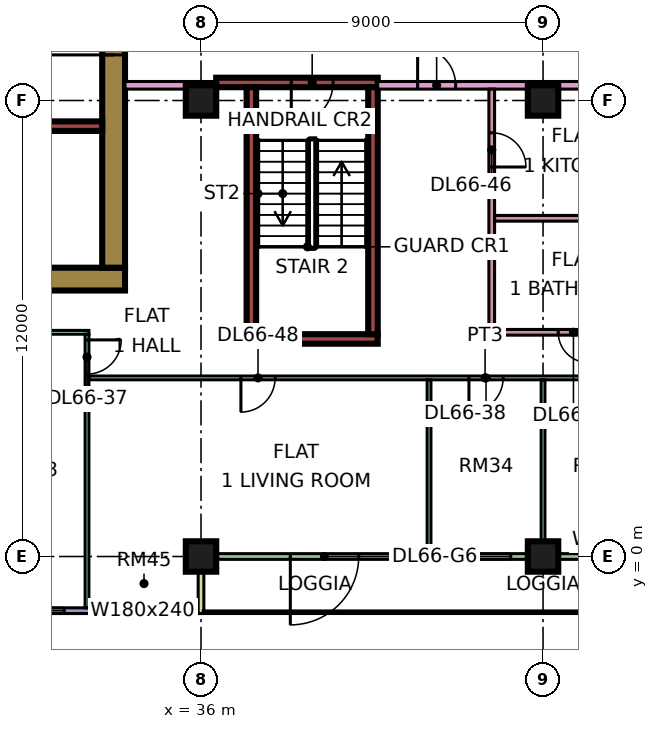
"""IFC4 building model, lengths in metres.
Left out: names, types, materials, properties, quantities, classifications, styles, units other than length and angle.
Written with IfcOpenShell. Run it as: python <this file> out.ifc"""

import sys

from ifc_helpers import new_model, si_unit, direction, frame, frame_2d, origin, origin_2d, place, context, subcontext, project, spatial, rectangle, extrude, element, fill, save


model = new_model("IFC4")
c1 = context("Model", 3, precision=1e-05, world=origin(), true_north=direction((0.0, 1.0)))
c2 = subcontext(c1, "Body", "Model", "MODEL_VIEW")
j1 = project(units=[si_unit("LENGTHUNIT", "METRE"), si_unit("PLANEANGLEUNIT", "RADIAN")], contexts=[c1])
p1 = place(None, origin())
s1 = spatial("IfcSite", under=j1, at=p1, CompositionType="ELEMENT")
p2 = place(p1, origin())
s2 = spatial("IfcBuilding", under=s1, at=p2, CompositionType="ELEMENT")
p3 = place(p2, frame((0.0, 0.0, 284.65)))
s3 = spatial("IfcBuildingStorey", under=s2, at=p3, CompositionType="ELEMENT", Elevation=284.65)
for number, where, z_axis, x_axis in (
    (1, (36.0, 0.0, 0.0), (0.0, 0.0, 1.0), (1.0, 0.0, 0.0)),
    (2, (36.0, 12.0, 0.0), (0.0, 0.0, 1.0), (1.0, 0.0, 0.0)),
    (3, (45.0, 0.0, 0.0), (0.0, 0.0, 1.0), (1.0, 0.0, 0.0)),
    (4, (45.0, 12.0, 0.0), (0.0, 0.0, 1.0), (1.0, 0.0, 0.0)),
):
    element("IfcColumn", number, at=place(p3, frame(where, z_axis=z_axis, x_axis=x_axis)), inside=s3, PredefinedType="COLUMN", context=c2, shape_type="SweptSolid", body=[
        extrude(rectangle(XDim=0.8, YDim=0.8, at=origin_2d()), origin(), (0.0, 0.0, 1.0), 3.75),
    ])
p4 = place(p3, frame((9.0, 7.3, 0.0), z_axis=(0.0, 0.0, 1.0), x_axis=(1.0, 0.0, 0.0)))
e5 = element("IfcWall", 5, at=p4, inside=s3, PredefinedType="SHEAR", context=c2, shape_type="SweptSolid", body=[
    extrude(rectangle(XDim=25.0, YDim=0.6, at=frame_2d((12.5, 0.0))), origin(), (0.0, 0.0, 1.0), 3.75),
])
p5 = place(p3, frame((33.7, 7.6, 0.0), z_axis=(0.0, 0.0, 1.0), x_axis=(0.0, 1.0, 0.0)))
e6 = element("IfcWall", 6, at=p5, inside=s3, PredefinedType="SHEAR", context=c2, shape_type="SweptSolid", body=[
    extrude(rectangle(XDim=11.8, YDim=0.6, at=frame_2d((5.9, 0.0))), origin(), (0.0, 0.0, 1.0), 3.75),
])
p6 = place(p5, frame((5.6, 0.0, 0.0)))
e7 = element("IfcOpeningElement", 7, at=p6, cuts=e6, PredefinedType="OPENING", context=c2, shape_type="SweptSolid", body=[
    extrude(rectangle(XDim=1.8, YDim=2.4, at=frame_2d((0.9, 1.2))), frame((0.0, 0.31, 0.0), z_axis=(0.0, -1.0, 0.0), x_axis=(1.0, 0.0, 0.0)), (0.0, 0.0, 1.0), 0.62),
])
p7 = place(p3, frame((13.45, 11.325, 0.0), z_axis=(0.0, 0.0, 1.0), x_axis=(1.0, 0.0, 0.0)))
e8 = element("IfcWall", 8, at=p7, inside=s3, PredefinedType="SHEAR", context=c2, shape_type="SweptSolid", body=[
    extrude(rectangle(XDim=19.95, YDim=0.25, at=frame_2d((9.975, 0.0))), origin(), (0.0, 0.0, 1.0), 3.75),
])
p8 = place(p7, frame((1.55, 0.0, 0.0)))
e9 = element("IfcOpeningElement", 9, at=p8, cuts=e8, PredefinedType="OPENING", context=c2, shape_type="SweptSolid", body=[
    extrude(rectangle(XDim=0.9, YDim=2.1, at=frame_2d((0.45, 1.05))), frame((0.0, 0.135, 0.0), z_axis=(0.0, -1.0, 0.0), x_axis=(1.0, 0.0, 0.0)), (0.0, 0.0, 1.0), 0.27),
])
p9 = place(p7, frame((6.925, 0.0, 0.0)))
e10 = element("IfcOpeningElement", 10, at=p9, cuts=e8, PredefinedType="OPENING", context=c2, shape_type="SweptSolid", body=[
    extrude(rectangle(XDim=0.9, YDim=2.1, at=frame_2d((0.45, 1.05))), frame((0.0, 0.135, 0.0), z_axis=(0.0, -1.0, 0.0), x_axis=(1.0, 0.0, 0.0)), (0.0, 0.0, 1.0), 0.27),
])
p10 = place(p7, frame((15.025, 0.0, 0.0)))
e11 = element("IfcOpeningElement", 11, at=p10, cuts=e8, PredefinedType="OPENING", context=c2, shape_type="SweptSolid", body=[
    extrude(rectangle(XDim=0.9, YDim=2.1, at=frame_2d((0.45, 1.05))), frame((0.0, 0.135, 0.0), z_axis=(0.0, -1.0, 0.0), x_axis=(1.0, 0.0, 0.0)), (0.0, 0.0, 1.0), 0.27),
])
p11 = place(p3, frame((37.2, 5.725, 0.0), z_axis=(0.0, 0.0, 1.0), x_axis=(1.0, 0.0, 0.0)))
e12 = element("IfcWall", 12, at=p11, inside=s3, PredefinedType="SHEAR", context=c2, shape_type="SweptSolid", body=[
    extrude(rectangle(XDim=3.45, YDim=0.25, at=frame_2d((1.725, 0.0))), origin(), (0.0, 0.0, 1.0), 3.75),
])
p12 = place(p3, frame((36.4, 12.475, 0.0), z_axis=(0.0, 0.0, 1.0), x_axis=(1.0, 0.0, 0.0)))
e13 = element("IfcWall", 13, at=p12, inside=s3, PredefinedType="SHEAR", context=c2, shape_type="SweptSolid", body=[
    extrude(rectangle(XDim=4.25, YDim=0.25, at=frame_2d((2.125, 0.0))), origin(), (0.0, 0.0, 1.0), 3.75),
])
p13 = place(p12, frame((1.975, 0.0, 0.0)))
e14 = element("IfcOpeningElement", 14, at=p13, cuts=e13, PredefinedType="OPENING", context=c2, shape_type="SweptSolid", body=[
    extrude(rectangle(XDim=1.1, YDim=2.2, at=frame_2d((0.55, 1.1))), frame((0.0, 0.135, 0.0), z_axis=(0.0, -1.0, 0.0), x_axis=(1.0, 0.0, 0.0)), (0.0, 0.0, 1.0), 0.27),
])
for number, where, z_axis, x_axis in (
    (15, (37.325, 5.85, 0.0), (0.0, 0.0, 1.0), (0.0, 1.0, 0.0)),
    (16, (40.525, 5.85, 0.0), (0.0, 0.0, 1.0), (0.0, 1.0, 0.0)),
):
    element("IfcWall", number, at=place(p3, frame(where, z_axis=z_axis, x_axis=x_axis)), inside=s3, PredefinedType="SHEAR", context=c2, shape_type="SweptSolid", body=[
        extrude(rectangle(XDim=6.5, YDim=0.25, at=frame_2d((3.25, 0.0))), origin(), (0.0, 0.0, 1.0), 3.75),
    ])
p14 = place(p3, frame((24.075, -1.425, 0.0), z_axis=(0.0, 0.0, 1.0), x_axis=(1.0, 0.0, 0.0)))
e17 = element("IfcWall", 17, at=p14, inside=s3, PredefinedType="SOLIDWALL", context=c2, shape_type="SweptSolid", body=[
    extrude(rectangle(XDim=11.85, YDim=0.15, at=frame_2d((5.925, 0.0))), origin(), (0.0, 0.0, 1.0), 3.35),
])
p15 = place(p14, frame((0.562, 0.0, 0.45)))
e18 = element("IfcOpeningElement", 18, at=p15, cuts=e17, PredefinedType="OPENING", context=c2, shape_type="SweptSolid", body=[
    extrude(rectangle(XDim=1.8, YDim=2.4, at=frame_2d((0.9, 1.2))), frame((0.0, 0.085, 0.0), z_axis=(0.0, -1.0, 0.0), x_axis=(1.0, 0.0, 0.0)), (0.0, 0.0, 1.0), 0.17),
])
p16 = place(p14, frame((3.525, 0.0, 0.45)))
e19 = element("IfcOpeningElement", 19, at=p16, cuts=e17, PredefinedType="OPENING", context=c2, shape_type="SweptSolid", body=[
    extrude(rectangle(XDim=1.8, YDim=2.4, at=frame_2d((0.9, 1.2))), frame((0.0, 0.085, 0.0), z_axis=(0.0, -1.0, 0.0), x_axis=(1.0, 0.0, 0.0)), (0.0, 0.0, 1.0), 0.17),
])
p17 = place(p14, frame((6.525, 0.0, 0.45)))
e20 = element("IfcOpeningElement", 20, at=p17, cuts=e17, PredefinedType="OPENING", context=c2, shape_type="SweptSolid", body=[
    extrude(rectangle(XDim=1.8, YDim=2.4, at=frame_2d((0.9, 1.2))), frame((0.0, 0.085, 0.0), z_axis=(0.0, -1.0, 0.0), x_axis=(1.0, 0.0, 0.0)), (0.0, 0.0, 1.0), 0.17),
])
p18 = place(p14, frame((9.488, 0.0, 0.45)))
e21 = element("IfcOpeningElement", 21, at=p18, cuts=e17, PredefinedType="OPENING", context=c2, shape_type="SweptSolid", body=[
    extrude(rectangle(XDim=1.8, YDim=2.4, at=frame_2d((0.9, 1.2))), frame((0.0, 0.085, 0.0), z_axis=(0.0, -1.0, 0.0), x_axis=(1.0, 0.0, 0.0)), (0.0, 0.0, 1.0), 0.17),
])
p19 = place(p3, frame((36.075, 0.0, 0.0), z_axis=(0.0, 0.0, 1.0), x_axis=(1.0, 0.0, 0.0)))
e22 = element("IfcWall", 22, at=p19, inside=s3, PredefinedType="SOLIDWALL", context=c2, shape_type="SweptSolid", body=[
    extrude(rectangle(XDim=11.85, YDim=0.15, at=frame_2d((5.925, 0.0))), origin(), (0.0, 0.0, 1.0), 3.35),
])
p20 = place(p19, frame((2.275, 0.0, 0.0)))
e23 = element("IfcOpeningElement", 23, at=p20, cuts=e22, PredefinedType="OPENING", context=c2, shape_type="SweptSolid", body=[
    extrude(rectangle(XDim=1.8, YDim=2.4, at=frame_2d((0.9, 1.2))), frame((0.0, 0.085, 0.0), z_axis=(0.0, -1.0, 0.0), x_axis=(1.0, 0.0, 0.0)), (0.0, 0.0, 1.0), 0.17),
])
p21 = place(p19, frame((6.275, 0.0, 0.45)))
e24 = element("IfcOpeningElement", 24, at=p21, cuts=e22, PredefinedType="OPENING", context=c2, shape_type="SweptSolid", body=[
    extrude(rectangle(XDim=1.8, YDim=2.4, at=frame_2d((0.9, 1.2))), frame((0.0, 0.085, 0.0), z_axis=(0.0, -1.0, 0.0), x_axis=(1.0, 0.0, 0.0)), (0.0, 0.0, 1.0), 0.17),
])
p22 = place(p19, frame((10.038, 0.0, 0.45)))
e25 = element("IfcOpeningElement", 25, at=p22, cuts=e22, PredefinedType="OPENING", context=c2, shape_type="SweptSolid", body=[
    extrude(rectangle(XDim=1.2, YDim=2.4, at=frame_2d((0.6, 1.2))), frame((0.0, 0.085, 0.0), z_axis=(0.0, -1.0, 0.0), x_axis=(1.0, 0.0, 0.0)), (0.0, 0.0, 1.0), 0.17),
])
p23 = place(p3, frame((36.0, -1.5, 0.0), z_axis=(0.0, 0.0, 1.0), x_axis=(0.0, 1.0, 0.0)))
e26 = element("IfcWall", 26, at=p23, inside=s3, PredefinedType="SOLIDWALL", context=c2, shape_type="SweptSolid", body=[
    extrude(rectangle(XDim=1.5, YDim=0.15, at=frame_2d((0.75, 0.0))), origin(), (0.0, 0.0, 1.0), 3.35),
])
p24 = place(p3, frame((11.95, 5.9, 0.0), z_axis=(0.0, 0.0, 1.0), x_axis=(1.0, 0.0, 0.0)))
e27 = element("IfcWall", 27, at=p24, inside=s3, PredefinedType="PARTITIONING", context=c2, shape_type="SweptSolid", body=[
    extrude(rectangle(XDim=21.1, YDim=0.1, at=frame_2d((10.55, 0.0))), origin(), (0.0, 0.0, 1.0), 3.35),
])
p25 = place(p24, frame((10.1, 0.0, 0.0)))
e28 = element("IfcOpeningElement", 28, at=p25, cuts=e27, PredefinedType="OPENING", context=c2, shape_type="SweptSolid", body=[
    extrude(rectangle(XDim=0.9, YDim=2.1, at=frame_2d((0.45, 1.05))), frame((0.0, 0.06, 0.0), z_axis=(0.0, -1.0, 0.0), x_axis=(1.0, 0.0, 0.0)), (0.0, 0.0, 1.0), 0.12),
])
p26 = place(p24, frame((13.1, 0.0, 0.0)))
e29 = element("IfcOpeningElement", 29, at=p26, cuts=e27, PredefinedType="OPENING", context=c2, shape_type="SweptSolid", body=[
    extrude(rectangle(XDim=0.9, YDim=2.1, at=frame_2d((0.45, 1.05))), frame((0.0, 0.06, 0.0), z_axis=(0.0, -1.0, 0.0), x_axis=(1.0, 0.0, 0.0)), (0.0, 0.0, 1.0), 0.12),
])
p27 = place(p24, frame((16.1, 0.0, 0.0)))
e30 = element("IfcOpeningElement", 30, at=p27, cuts=e27, PredefinedType="OPENING", context=c2, shape_type="SweptSolid", body=[
    extrude(rectangle(XDim=0.9, YDim=2.1, at=frame_2d((0.45, 1.05))), frame((0.0, 0.06, 0.0), z_axis=(0.0, -1.0, 0.0), x_axis=(1.0, 0.0, 0.0)), (0.0, 0.0, 1.0), 0.12),
])
p28 = place(p24, frame((4.1, 0.0, 0.0)))
e31 = element("IfcOpeningElement", 31, at=p28, cuts=e27, PredefinedType="OPENING", context=c2, shape_type="SweptSolid", body=[
    extrude(rectangle(XDim=0.9, YDim=2.1, at=frame_2d((0.45, 1.05))), frame((0.0, 0.06, 0.0), z_axis=(0.0, -1.0, 0.0), x_axis=(1.0, 0.0, 0.0)), (0.0, 0.0, 1.0), 0.12),
])
p29 = place(p3, frame((33.0, -1.35, 0.0), z_axis=(0.0, 0.0, 1.0), x_axis=(0.0, 1.0, 0.0)))
e32 = element("IfcWall", 32, at=p29, inside=s3, PredefinedType="PARTITIONING", context=c2, shape_type="SweptSolid", body=[
    extrude(rectangle(XDim=7.2, YDim=0.1, at=frame_2d((3.6, 0.0))), origin(), (0.0, 0.0, 1.0), 3.35),
])
p30 = place(p29, frame((6.15, 0.0, 0.0)))
e33 = element("IfcOpeningElement", 33, at=p30, cuts=e32, PredefinedType="OPENING", context=c2, shape_type="SweptSolid", body=[
    extrude(rectangle(XDim=0.9, YDim=2.1, at=frame_2d((0.45, 1.05))), frame((0.0, 0.06, 0.0), z_axis=(0.0, -1.0, 0.0), x_axis=(1.0, 0.0, 0.0)), (0.0, 0.0, 1.0), 0.12),
])
p31 = place(p3, frame((33.05, 4.7, 0.0), z_axis=(0.0, 0.0, 1.0), x_axis=(1.0, 0.0, 0.0)))
e34 = element("IfcWall", 34, at=p31, inside=s3, PredefinedType="PARTITIONING", context=c2, shape_type="SweptSolid", body=[
    extrude(rectangle(XDim=20.85, YDim=0.1, at=frame_2d((10.425, 0.0))), origin(), (0.0, 0.0, 1.0), 3.35),
])
p32 = place(p31, frame((10.0, 0.0, 0.0)))
e35 = element("IfcOpeningElement", 35, at=p32, cuts=e34, PredefinedType="OPENING", context=c2, shape_type="SweptSolid", body=[
    extrude(rectangle(XDim=0.9, YDim=2.1, at=frame_2d((0.45, 1.05))), frame((0.0, 0.06, 0.0), z_axis=(0.0, -1.0, 0.0), x_axis=(1.0, 0.0, 0.0)), (0.0, 0.0, 1.0), 0.12),
])
p33 = place(p31, frame((13.0, 0.0, 0.0)))
e36 = element("IfcOpeningElement", 36, at=p33, cuts=e34, PredefinedType="OPENING", context=c2, shape_type="SweptSolid", body=[
    extrude(rectangle(XDim=0.9, YDim=2.1, at=frame_2d((0.45, 1.05))), frame((0.0, 0.06, 0.0), z_axis=(0.0, -1.0, 0.0), x_axis=(1.0, 0.0, 0.0)), (0.0, 0.0, 1.0), 0.12),
])
p34 = place(p31, frame((16.0, 0.0, 0.0)))
e37 = element("IfcOpeningElement", 37, at=p34, cuts=e34, PredefinedType="OPENING", context=c2, shape_type="SweptSolid", body=[
    extrude(rectangle(XDim=0.9, YDim=2.1, at=frame_2d((0.45, 1.05))), frame((0.0, 0.06, 0.0), z_axis=(0.0, -1.0, 0.0), x_axis=(1.0, 0.0, 0.0)), (0.0, 0.0, 1.0), 0.12),
])
p35 = place(p31, frame((19.0, 0.0, 0.0)))
e38 = element("IfcOpeningElement", 38, at=p35, cuts=e34, PredefinedType="OPENING", context=c2, shape_type="SweptSolid", body=[
    extrude(rectangle(XDim=0.9, YDim=2.1, at=frame_2d((0.45, 1.05))), frame((0.0, 0.06, 0.0), z_axis=(0.0, -1.0, 0.0), x_axis=(1.0, 0.0, 0.0)), (0.0, 0.0, 1.0), 0.12),
])
p36 = place(p31, frame((4.0, 0.0, 0.0)))
e39 = element("IfcOpeningElement", 39, at=p36, cuts=e34, PredefinedType="OPENING", context=c2, shape_type="SweptSolid", body=[
    extrude(rectangle(XDim=0.9, YDim=2.1, at=frame_2d((0.45, 1.05))), frame((0.0, 0.06, 0.0), z_axis=(0.0, -1.0, 0.0), x_axis=(1.0, 0.0, 0.0)), (0.0, 0.0, 1.0), 0.12),
])
p37 = place(p3, frame((34.0, 12.4, 0.0), z_axis=(0.0, 0.0, 1.0), x_axis=(1.0, 0.0, 0.0)))
e40 = element("IfcWall", 40, at=p37, inside=s3, PredefinedType="PARTITIONING", context=c2, shape_type="SweptSolid", body=[
    extrude(rectangle(XDim=2.401, YDim=0.2, at=frame_2d((1.2, 0.0))), origin(), (0.0, 0.0, 1.0), 3.35),
])
p38 = place(p3, frame((40.65, 12.4, 0.0), z_axis=(0.0, 0.0, 1.0), x_axis=(1.0, 0.0, 0.0)))
e41 = element("IfcWall", 41, at=p38, inside=s3, PredefinedType="PARTITIONING", context=c2, shape_type="SweptSolid", body=[
    extrude(rectangle(XDim=22.276, YDim=0.2, at=frame_2d((11.138, 0.0))), origin(), (0.0, 0.0, 1.0), 3.35),
])
p39 = place(p38, frame((14.7, 0.0, 0.0)))
e42 = element("IfcOpeningElement", 42, at=p39, cuts=e41, PredefinedType="OPENING", context=c2, shape_type="SweptSolid", body=[
    extrude(rectangle(XDim=1.0, YDim=2.1, at=frame_2d((0.5, 1.05))), frame((0.0, 0.11, 0.0), z_axis=(0.0, -1.0, 0.0), x_axis=(1.0, 0.0, 0.0)), (0.0, 0.0, 1.0), 0.22),
])
p40 = place(p38, frame((1.05, 0.0, 0.0)))
e43 = element("IfcOpeningElement", 43, at=p40, cuts=e41, PredefinedType="OPENING", context=c2, shape_type="SweptSolid", body=[
    extrude(rectangle(XDim=1.0, YDim=2.1, at=frame_2d((0.5, 1.05))), frame((0.0, 0.11, 0.0), z_axis=(0.0, -1.0, 0.0), x_axis=(1.0, 0.0, 0.0)), (0.0, 0.0, 1.0), 0.22),
])
p41 = place(p3, frame((42.0, 0.074, 0.0), z_axis=(0.0, 0.0, 1.0), x_axis=(0.0, 1.0, 0.0)))
e44 = element("IfcWall", 44, at=p41, inside=s3, PredefinedType="PARTITIONING", context=c2, shape_type="SweptSolid", body=[
    extrude(rectangle(XDim=4.576, YDim=0.1, at=frame_2d((2.288, 0.0))), origin(), (0.0, 0.0, 1.0), 3.35),
])
p42 = place(p3, frame((43.575, 5.9, 0.0), z_axis=(0.0, 0.0, 1.0), x_axis=(1.0, 0.0, 0.0)))
e45 = element("IfcWall", 45, at=p42, inside=s3, PredefinedType="PARTITIONING", context=c2, shape_type="SweptSolid", body=[
    extrude(rectangle(XDim=10.325, YDim=0.15, at=frame_2d((5.163, 0.0))), origin(), (0.0, 0.0, 1.0), 3.35),
])
p43 = place(p42, frame((1.825, 0.0, 0.0)))
e46 = element("IfcOpeningElement", 46, at=p43, cuts=e45, PredefinedType="OPENING", context=c2, shape_type="SweptSolid", body=[
    extrude(rectangle(XDim=0.8, YDim=2.1, at=frame_2d((0.4, 1.05))), frame((0.0, 0.085, 0.0), z_axis=(0.0, -1.0, 0.0), x_axis=(1.0, 0.0, 0.0)), (0.0, 0.0, 1.0), 0.17),
])
p44 = place(p42, frame((6.975, 0.0, 0.0)))
e47 = element("IfcOpeningElement", 47, at=p44, cuts=e45, PredefinedType="OPENING", context=c2, shape_type="SweptSolid", body=[
    extrude(rectangle(XDim=0.9, YDim=2.1, at=frame_2d((0.45, 1.05))), frame((0.0, 0.085, 0.0), z_axis=(0.0, -1.0, 0.0), x_axis=(1.0, 0.0, 0.0)), (0.0, 0.0, 1.0), 0.17),
])
p45 = place(p3, frame((43.65, 5.975, 0.0), z_axis=(0.0, 0.0, 1.0), x_axis=(0.0, 1.0, 0.0)))
e48 = element("IfcWall", 48, at=p45, inside=s3, PredefinedType="PARTITIONING", context=c2, shape_type="SweptSolid", body=[
    extrude(rectangle(XDim=6.325, YDim=0.15, at=frame_2d((3.163, 0.0))), origin(), (0.0, 0.0, 1.0), 3.35),
])
p46 = place(p45, frame((4.275, 0.0, 0.0)))
e49 = element("IfcOpeningElement", 49, at=p46, cuts=e48, PredefinedType="OPENING", context=c2, shape_type="SweptSolid", body=[
    extrude(rectangle(XDim=0.9, YDim=2.1, at=frame_2d((0.45, 1.05))), frame((0.0, 0.085, 0.0), z_axis=(0.0, -1.0, 0.0), x_axis=(1.0, 0.0, 0.0)), (0.0, 0.0, 1.0), 0.17),
])
p47 = place(p3, frame((43.725, 8.9, 0.0), z_axis=(0.0, 0.0, 1.0), x_axis=(1.0, 0.0, 0.0)))
e50 = element("IfcWall", 50, at=p47, inside=s3, PredefinedType="PARTITIONING", context=c2, shape_type="SweptSolid", body=[
    extrude(rectangle(XDim=4.2, YDim=0.15, at=frame_2d((2.1, 0.0))), origin(), (0.0, 0.0, 1.0), 3.35),
])
p48 = place(p3, frame((45.0, 0.074, 0.0), z_axis=(0.0, 0.0, 1.0), x_axis=(0.0, 1.0, 0.0)))
e51 = element("IfcWall", 51, at=p48, inside=s3, PredefinedType="PARTITIONING", context=c2, shape_type="SweptSolid", body=[
    extrude(rectangle(XDim=4.576, YDim=0.1, at=frame_2d((2.288, 0.0))), origin(), (0.0, 0.0, 1.0), 3.35),
])
p49 = place(p17, origin())
e52 = element("IfcWindow", 52, at=p49, inside=s3, PartitioningType="SINGLE_PANEL", PredefinedType="WINDOW", context=c2, shape_type="SweptSolid", body=[
    extrude(rectangle(XDim=1.8, YDim=2.4, at=frame_2d((0.9, 1.2))), frame((0.0, 0.03, 0.0), z_axis=(0.0, -1.0, 0.0), x_axis=(1.0, 0.0, 0.0)), (0.0, 0.0, 1.0), 0.06),
])
fill(e20, e52)
p50 = place(p18, origin())
e53 = element("IfcWindow", 53, at=p50, inside=s3, PartitioningType="SINGLE_PANEL", PredefinedType="WINDOW", context=c2, shape_type="SweptSolid", body=[
    extrude(rectangle(XDim=1.8, YDim=2.4, at=frame_2d((0.9, 1.2))), frame((0.0, 0.03, 0.0), z_axis=(0.0, -1.0, 0.0), x_axis=(1.0, 0.0, 0.0)), (0.0, 0.0, 1.0), 0.06),
])
fill(e21, e53)
p51 = place(p20, frame((1.8, 0.0, 0.0), z_axis=(0.0, 0.0, 1.0), x_axis=(-1.0, 0.0, 0.0)))
e54 = element("IfcDoor", 54, at=p51, inside=s3, OperationType="DOUBLE_DOOR_SINGLE_SWING", PredefinedType="DOOR", context=c2, shape_type="SweptSolid", body=[
    extrude(rectangle(XDim=1.8, YDim=2.4, at=frame_2d((0.9, 1.2))), frame((0.0, 0.025, 0.0), z_axis=(0.0, -1.0, 0.0), x_axis=(1.0, 0.0, 0.0)), (0.0, 0.0, 1.0), 0.05),
])
fill(e23, e54)
p52 = place(p21, origin())
e55 = element("IfcWindow", 55, at=p52, inside=s3, PartitioningType="SINGLE_PANEL", PredefinedType="WINDOW", context=c2, shape_type="SweptSolid", body=[
    extrude(rectangle(XDim=1.8, YDim=2.4, at=frame_2d((0.9, 1.2))), frame((0.0, 0.03, 0.0), z_axis=(0.0, -1.0, 0.0), x_axis=(1.0, 0.0, 0.0)), (0.0, 0.0, 1.0), 0.06),
])
fill(e24, e55)
p53 = place(p6, origin())
e56 = element("IfcDoor", 56, at=p53, inside=s3, OperationType="DOUBLE_DOOR_SINGLE_SWING", PredefinedType="DOOR", context=c2, shape_type="SweptSolid", body=[
    extrude(rectangle(XDim=1.8, YDim=2.4, at=frame_2d((0.9, 1.2))), frame((0.0, 0.025, 0.0), z_axis=(0.0, -1.0, 0.0), x_axis=(1.0, 0.0, 0.0)), (0.0, 0.0, 1.0), 0.05),
])
fill(e7, e56)
p54 = place(p13, frame((1.1, 0.0, 0.0), z_axis=(0.0, 0.0, 1.0), x_axis=(-1.0, 0.0, 0.0)))
e57 = element("IfcDoor", 57, at=p54, inside=s3, OperationType="SINGLE_SWING_LEFT", PredefinedType="DOOR", context=c2, shape_type="SweptSolid", body=[
    extrude(rectangle(XDim=1.1, YDim=2.2, at=frame_2d((0.55, 1.1))), frame((0.0, 0.025, 0.0), z_axis=(0.0, -1.0, 0.0), x_axis=(1.0, 0.0, 0.0)), (0.0, 0.0, 1.0), 0.05),
])
fill(e14, e57)
p55 = place(p43, origin())
e58 = element("IfcDoor", 58, at=p55, inside=s3, OperationType="SINGLE_SWING_RIGHT", PredefinedType="DOOR", context=c2, shape_type="SweptSolid", body=[
    extrude(rectangle(XDim=0.8, YDim=2.1, at=frame_2d((0.4, 1.05))), frame((0.0, 0.025, 0.0), z_axis=(0.0, -1.0, 0.0), x_axis=(1.0, 0.0, 0.0)), (0.0, 0.0, 1.0), 0.05),
])
fill(e46, e58)
p56 = place(p30, origin())
e59 = element("IfcDoor", 59, at=p56, inside=s3, OperationType="SINGLE_SWING_RIGHT", PredefinedType="DOOR", context=c2, shape_type="SweptSolid", body=[
    extrude(rectangle(XDim=0.9, YDim=2.1, at=frame_2d((0.45, 1.05))), frame((0.0, 0.025, 0.0), z_axis=(0.0, -1.0, 0.0), x_axis=(1.0, 0.0, 0.0)), (0.0, 0.0, 1.0), 0.05),
])
fill(e33, e59)
p57 = place(p32, frame((0.9, 0.0, 0.0), z_axis=(0.0, 0.0, 1.0), x_axis=(-1.0, 0.0, 0.0)))
e60 = element("IfcDoor", 60, at=p57, inside=s3, OperationType="SINGLE_SWING_LEFT", PredefinedType="DOOR", context=c2, shape_type="SweptSolid", body=[
    extrude(rectangle(XDim=0.9, YDim=2.1, at=frame_2d((0.45, 1.05))), frame((0.0, 0.025, 0.0), z_axis=(0.0, -1.0, 0.0), x_axis=(1.0, 0.0, 0.0)), (0.0, 0.0, 1.0), 0.05),
])
fill(e35, e60)
p58 = place(p40, origin())
e61 = element("IfcDoor", 61, at=p58, inside=s3, OperationType="SINGLE_SWING_LEFT", PredefinedType="DOOR", context=c2, shape_type="SweptSolid", body=[
    extrude(rectangle(XDim=1.0, YDim=2.1, at=frame_2d((0.5, 1.05))), frame((0.0, 0.025, 0.0), z_axis=(0.0, -1.0, 0.0), x_axis=(1.0, 0.0, 0.0)), (0.0, 0.0, 1.0), 0.05),
])
fill(e43, e61)
p59 = place(p46, frame((0.9, 0.0, 0.0), z_axis=(0.0, 0.0, 1.0), x_axis=(-1.0, 0.0, 0.0)))
e62 = element("IfcDoor", 62, at=p59, inside=s3, OperationType="SINGLE_SWING_LEFT", PredefinedType="DOOR", context=c2, shape_type="SweptSolid", body=[
    extrude(rectangle(XDim=0.9, YDim=2.1, at=frame_2d((0.45, 1.05))), frame((0.0, 0.025, 0.0), z_axis=(0.0, -1.0, 0.0), x_axis=(1.0, 0.0, 0.0)), (0.0, 0.0, 1.0), 0.05),
])
fill(e49, e62)
p60 = place(p36, frame((0.9, 0.0, 0.0), z_axis=(0.0, 0.0, 1.0), x_axis=(-1.0, 0.0, 0.0)))
e63 = element("IfcDoor", 63, at=p60, inside=s3, OperationType="SINGLE_SWING_LEFT", PredefinedType="DOOR", context=c2, shape_type="SweptSolid", body=[
    extrude(rectangle(XDim=0.9, YDim=2.1, at=frame_2d((0.45, 1.05))), frame((0.0, 0.025, 0.0), z_axis=(0.0, -1.0, 0.0), x_axis=(1.0, 0.0, 0.0)), (0.0, 0.0, 1.0), 0.05),
])
fill(e39, e63)
save(model, sys.argv[1])
